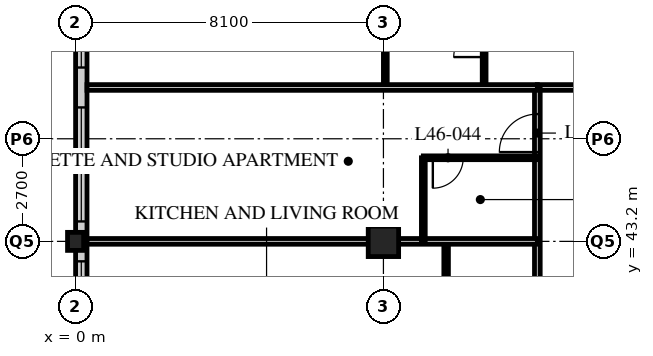
"""IFC4 building model, lengths in metres.
Left out: names, types, materials, properties, quantities, classifications, styles, units other than length and angle.
Written with IfcOpenShell. Run it as: python <this file> out.ifc"""

import sys

from ifc_helpers import new_model, si_unit, direction, frame, frame_2d, origin, origin_2d, place, context, subcontext, project, spatial, rectangle, hollow_rectangle, i_section, extrude, element, fill, save


model = new_model("IFC4")
c1 = context("Model", 3, precision=1e-05, world=origin(), true_north=direction((0.0, 1.0)))
c2 = subcontext(c1, "Body", "Model", "MODEL_VIEW")
j1 = project(units=[si_unit("LENGTHUNIT", "METRE"), si_unit("PLANEANGLEUNIT", "RADIAN")], contexts=[c1])
p1 = place(None, origin())
s1 = spatial("IfcSite", under=j1, at=p1, CompositionType="ELEMENT")
p2 = place(p1, origin())
s2 = spatial("IfcBuilding", under=s1, at=p2, CompositionType="ELEMENT")
p3 = place(p2, frame((0.0, 0.0, 181.2)))
s3 = spatial("IfcBuildingStorey", under=s2, at=p3, CompositionType="ELEMENT", Elevation=181.2)
p4 = place(p3, frame((0.0, 43.2, 0.0), z_axis=(0.0, 0.0, 1.0), x_axis=(1.0, 0.0, 0.0)))
e1 = element("IfcColumn", 1, at=p4, inside=s3, PredefinedType="COLUMN", context=c2, shape_type="SweptSolid", body=[
    extrude(i_section(OverallWidth=0.424, OverallDepth=0.475, WebThickness=0.048, FlangeThickness=0.077, FilletRadius=0.015, at=origin_2d()), origin(), (0.0, 0.0, 1.0), 3.6),
])
p5 = place(p3, frame((8.1, 43.2, 0.0), z_axis=(0.0, 0.0, 1.0), x_axis=(1.0, 0.0, 0.0)))
e2 = element("IfcColumn", 2, at=p5, inside=s3, PredefinedType="COLUMN", context=c2, shape_type="SweptSolid", body=[
    extrude(hollow_rectangle(XDim=0.8, YDim=0.8, WallThickness=0.08, at=origin_2d()), origin(), (0.0, 0.0, 1.0), 3.6),
])
p6 = place(p3, frame((0.15, 51.0, 0.0), z_axis=(0.0, 0.0, 1.0), x_axis=(0.0, -1.0, 0.0)))
e3 = element("IfcWall", 3, at=p6, inside=s3, PredefinedType="SOLIDWALL", context=c2, shape_type="SweptSolid", body=[
    extrude(rectangle(XDim=32.1, YDim=0.3, at=frame_2d((16.05, 0.0))), origin(), (0.0, 0.0, 1.0), 3.39),
])
p7 = place(p6, frame((0.225, 0.0, 0.6)))
e4 = element("IfcOpeningElement", 4, at=p7, cuts=e3, PredefinedType="OPENING", context=c2, shape_type="SweptSolid", body=[
    extrude(rectangle(XDim=3.0, YDim=2.4, at=frame_2d((1.5, 1.2))), frame((0.0, 0.16, 0.0), z_axis=(0.0, -1.0, 0.0), x_axis=(1.0, 0.0, 0.0)), (0.0, 0.0, 1.0), 0.32),
])
p8 = place(p6, frame((4.275, 0.0, 0.6)))
e5 = element("IfcOpeningElement", 5, at=p8, cuts=e3, PredefinedType="OPENING", context=c2, shape_type="SweptSolid", body=[
    extrude(rectangle(XDim=3.0, YDim=2.4, at=frame_2d((1.5, 1.2))), frame((0.0, 0.16, 0.0), z_axis=(0.0, -1.0, 0.0), x_axis=(1.0, 0.0, 0.0)), (0.0, 0.0, 1.0), 0.32),
])
p9 = place(p6, frame((8.325, 0.0, 0.6)))
e6 = element("IfcOpeningElement", 6, at=p9, cuts=e3, PredefinedType="OPENING", context=c2, shape_type="SweptSolid", body=[
    extrude(rectangle(XDim=3.0, YDim=2.4, at=frame_2d((1.5, 1.2))), frame((0.0, 0.16, 0.0), z_axis=(0.0, -1.0, 0.0), x_axis=(1.0, 0.0, 0.0)), (0.0, 0.0, 1.0), 0.32),
])
p10 = place(p6, frame((12.375, 0.0, 0.6)))
e7 = element("IfcOpeningElement", 7, at=p10, cuts=e3, PredefinedType="OPENING", context=c2, shape_type="SweptSolid", body=[
    extrude(rectangle(XDim=3.0, YDim=2.4, at=frame_2d((1.5, 1.2))), frame((0.0, 0.16, 0.0), z_axis=(0.0, -1.0, 0.0), x_axis=(1.0, 0.0, 0.0)), (0.0, 0.0, 1.0), 0.32),
])
p11 = place(p6, frame((16.425, 0.0, 0.6)))
e8 = element("IfcOpeningElement", 8, at=p11, cuts=e3, PredefinedType="OPENING", context=c2, shape_type="SweptSolid", body=[
    extrude(rectangle(XDim=3.0, YDim=2.4, at=frame_2d((1.5, 1.2))), frame((0.0, 0.16, 0.0), z_axis=(0.0, -1.0, 0.0), x_axis=(1.0, 0.0, 0.0)), (0.0, 0.0, 1.0), 0.32),
])
p12 = place(p6, frame((20.475, 0.0, 0.6)))
e9 = element("IfcOpeningElement", 9, at=p12, cuts=e3, PredefinedType="OPENING", context=c2, shape_type="SweptSolid", body=[
    extrude(rectangle(XDim=3.0, YDim=2.4, at=frame_2d((1.5, 1.2))), frame((0.0, 0.16, 0.0), z_axis=(0.0, -1.0, 0.0), x_axis=(1.0, 0.0, 0.0)), (0.0, 0.0, 1.0), 0.32),
])
p13 = place(p6, frame((24.525, 0.0, 0.6)))
e10 = element("IfcOpeningElement", 10, at=p13, cuts=e3, PredefinedType="OPENING", context=c2, shape_type="SweptSolid", body=[
    extrude(rectangle(XDim=3.0, YDim=2.4, at=frame_2d((1.5, 1.2))), frame((0.0, 0.16, 0.0), z_axis=(0.0, -1.0, 0.0), x_axis=(1.0, 0.0, 0.0)), (0.0, 0.0, 1.0), 0.32),
])
p14 = place(p6, frame((28.575, 0.0, 0.6)))
e11 = element("IfcOpeningElement", 11, at=p14, cuts=e3, PredefinedType="OPENING", context=c2, shape_type="SweptSolid", body=[
    extrude(rectangle(XDim=3.0, YDim=2.4, at=frame_2d((1.5, 1.2))), frame((0.0, 0.16, 0.0), z_axis=(0.0, -1.0, 0.0), x_axis=(1.0, 0.0, 0.0)), (0.0, 0.0, 1.0), 0.32),
])
p15 = place(p3, frame((12.15, 47.25, 0.0), z_axis=(0.0, 0.0, 1.0), x_axis=(1.0, 0.0, 0.0)))
e12 = element("IfcWall", 12, at=p15, inside=s3, PredefinedType="PARTITIONING", context=c2, shape_type="SweptSolid", body=[
    extrude(rectangle(XDim=32.4, YDim=0.15, at=frame_2d((16.2, 0.0))), origin(), (0.0, 0.0, 1.0), 3.39),
])
p16 = place(p15, frame((4.45, 0.0, 0.0)))
e13 = element("IfcOpeningElement", 13, at=p16, cuts=e12, PredefinedType="OPENING", context=c2, shape_type="SweptSolid", body=[
    extrude(rectangle(XDim=1.0, YDim=2.1, at=frame_2d((0.5, 1.05))), frame((0.0, 0.085, 0.0), z_axis=(0.0, -1.0, 0.0), x_axis=(1.0, 0.0, 0.0)), (0.0, 0.0, 1.0), 0.17),
])
p17 = place(p15, frame((16.6, 0.0, 0.0)))
e14 = element("IfcOpeningElement", 14, at=p17, cuts=e12, PredefinedType="OPENING", context=c2, shape_type="SweptSolid", body=[
    extrude(rectangle(XDim=1.0, YDim=2.1, at=frame_2d((0.5, 1.05))), frame((0.0, 0.085, 0.0), z_axis=(0.0, -1.0, 0.0), x_axis=(1.0, 0.0, 0.0)), (0.0, 0.0, 1.0), 0.17),
])
p18 = place(p15, frame((29.875, 0.0, 0.0)))
e15 = element("IfcOpeningElement", 15, at=p18, cuts=e12, PredefinedType="OPENING", context=c2, shape_type="SweptSolid", body=[
    extrude(rectangle(XDim=1.0, YDim=2.1, at=frame_2d((0.5, 1.05))), frame((0.0, 0.085, 0.0), z_axis=(0.0, -1.0, 0.0), x_axis=(1.0, 0.0, 0.0)), (0.0, 0.0, 1.0), 0.17),
])
p19 = place(p15, frame((1.525, 0.0, 0.0)))
e16 = element("IfcOpeningElement", 16, at=p19, cuts=e12, PredefinedType="OPENING", context=c2, shape_type="SweptSolid", body=[
    extrude(rectangle(XDim=1.0, YDim=2.1, at=frame_2d((0.5, 1.05))), frame((0.0, 0.085, 0.0), z_axis=(0.0, -1.0, 0.0), x_axis=(1.0, 0.0, 0.0)), (0.0, 0.0, 1.0), 0.17),
])
p20 = place(p3, frame((12.15, 18.9, 0.0), z_axis=(0.0, 0.0, 1.0), x_axis=(0.0, 1.0, 0.0)))
e17 = element("IfcWall", 17, at=p20, inside=s3, PredefinedType="PARTITIONING", context=c2, shape_type="SweptSolid", body=[
    extrude(rectangle(XDim=28.35, YDim=0.15, at=frame_2d((14.175, 0.0))), origin(), (0.0, 0.0, 1.0), 3.39),
])
p21 = place(p20, frame((2.35, 0.0, 0.0)))
e18 = element("IfcOpeningElement", 18, at=p21, cuts=e17, PredefinedType="OPENING", context=c2, shape_type="SweptSolid", body=[
    extrude(rectangle(XDim=1.0, YDim=2.1, at=frame_2d((0.5, 1.05))), frame((0.0, 0.085, 0.0), z_axis=(0.0, -1.0, 0.0), x_axis=(1.0, 0.0, 0.0)), (0.0, 0.0, 1.0), 0.17),
])
p22 = place(p20, frame((6.4, 0.0, 0.0)))
e19 = element("IfcOpeningElement", 19, at=p22, cuts=e17, PredefinedType="OPENING", context=c2, shape_type="SweptSolid", body=[
    extrude(rectangle(XDim=1.0, YDim=2.1, at=frame_2d((0.5, 1.05))), frame((0.0, 0.085, 0.0), z_axis=(0.0, -1.0, 0.0), x_axis=(1.0, 0.0, 0.0)), (0.0, 0.0, 1.0), 0.17),
])
p23 = place(p20, frame((8.5, 0.0, 0.0)))
e20 = element("IfcOpeningElement", 20, at=p23, cuts=e17, PredefinedType="OPENING", context=c2, shape_type="SweptSolid", body=[
    extrude(rectangle(XDim=1.0, YDim=2.1, at=frame_2d((0.5, 1.05))), frame((0.0, 0.085, 0.0), z_axis=(0.0, -1.0, 0.0), x_axis=(1.0, 0.0, 0.0)), (0.0, 0.0, 1.0), 0.17),
])
p24 = place(p20, frame((16.6, 0.0, 0.0)))
e21 = element("IfcOpeningElement", 21, at=p24, cuts=e17, PredefinedType="OPENING", context=c2, shape_type="SweptSolid", body=[
    extrude(rectangle(XDim=1.0, YDim=2.1, at=frame_2d((0.5, 1.05))), frame((0.0, 0.085, 0.0), z_axis=(0.0, -1.0, 0.0), x_axis=(1.0, 0.0, 0.0)), (0.0, 0.0, 1.0), 0.17),
])
p25 = place(p20, frame((26.65, 0.0, 0.0)))
e22 = element("IfcOpeningElement", 22, at=p25, cuts=e17, PredefinedType="OPENING", context=c2, shape_type="SweptSolid", body=[
    extrude(rectangle(XDim=1.0, YDim=2.1, at=frame_2d((0.5, 1.05))), frame((0.0, 0.085, 0.0), z_axis=(0.0, -1.0, 0.0), x_axis=(1.0, 0.0, 0.0)), (0.0, 0.0, 1.0), 0.17),
])
p26 = place(p3, frame((9.75, 27.0, 0.0), z_axis=(0.0, 0.0, 1.0), x_axis=(0.0, 1.0, 0.0)))
e23 = element("IfcWall", 23, at=p26, inside=s3, PredefinedType="PARTITIONING", context=c2, shape_type="SweptSolid", body=[
    extrude(rectangle(XDim=16.2, YDim=0.12, at=frame_2d((8.1, 0.0))), origin(), (0.0, 0.0, 1.0), 3.39),
])
p27 = place(p26, frame((0.975, 0.0, 0.0)))
e24 = element("IfcOpeningElement", 24, at=p27, cuts=e23, PredefinedType="OPENING", context=c2, shape_type="SweptSolid", body=[
    extrude(rectangle(XDim=0.85, YDim=2.1, at=frame_2d((0.425, 1.05))), frame((0.0, 0.07, 0.0), z_axis=(0.0, -1.0, 0.0), x_axis=(1.0, 0.0, 0.0)), (0.0, 0.0, 1.0), 0.14),
])
p28 = place(p26, frame((4.375, 0.0, 0.0)))
e25 = element("IfcOpeningElement", 25, at=p28, cuts=e23, PredefinedType="OPENING", context=c2, shape_type="SweptSolid", body=[
    extrude(rectangle(XDim=0.85, YDim=2.1, at=frame_2d((0.425, 1.05))), frame((0.0, 0.07, 0.0), z_axis=(0.0, -1.0, 0.0), x_axis=(1.0, 0.0, 0.0)), (0.0, 0.0, 1.0), 0.14),
])
p29 = place(p26, frame((9.075, 0.0, 0.0)))
e26 = element("IfcOpeningElement", 26, at=p29, cuts=e23, PredefinedType="OPENING", context=c2, shape_type="SweptSolid", body=[
    extrude(rectangle(XDim=0.85, YDim=2.1, at=frame_2d((0.425, 1.05))), frame((0.0, 0.07, 0.0), z_axis=(0.0, -1.0, 0.0), x_axis=(1.0, 0.0, 0.0)), (0.0, 0.0, 1.0), 0.14),
])
p30 = place(p26, frame((12.475, 0.0, 0.0)))
e27 = element("IfcOpeningElement", 27, at=p30, cuts=e23, PredefinedType="OPENING", context=c2, shape_type="SweptSolid", body=[
    extrude(rectangle(XDim=0.85, YDim=2.1, at=frame_2d((0.425, 1.05))), frame((0.0, 0.07, 0.0), z_axis=(0.0, -1.0, 0.0), x_axis=(1.0, 0.0, 0.0)), (0.0, 0.0, 1.0), 0.14),
])
p31 = place(p3, frame((12.15, 43.2, 0.0), z_axis=(0.0, 0.0, 1.0), x_axis=(-1.0, 0.0, 0.0)))
e28 = element("IfcWall", 28, at=p31, inside=s3, PredefinedType="PARTITIONING", context=c2, shape_type="SweptSolid", body=[
    extrude(rectangle(XDim=11.85, YDim=0.15, at=frame_2d((5.925, 0.0))), origin(), (0.0, 0.0, 1.0), 2.778),
])
p32 = place(p3, frame((9.15, 43.2, 0.0), z_axis=(0.0, 0.0, 1.0), x_axis=(0.0, 1.0, 0.0)))
e29 = element("IfcWall", 29, at=p32, inside=s3, PredefinedType="PARTITIONING", context=c2, shape_type="SweptSolid", body=[
    extrude(rectangle(XDim=2.2, YDim=0.1, at=frame_2d((1.1, 0.0))), origin(), (0.0, 0.0, 1.0), 3.39),
])
p33 = place(p3, frame((12.15, 45.4, 0.0), z_axis=(0.0, 0.0, 1.0), x_axis=(-1.0, 0.0, 0.0)))
e30 = element("IfcWall", 30, at=p33, inside=s3, PredefinedType="PARTITIONING", context=c2, shape_type="SweptSolid", body=[
    extrude(rectangle(XDim=3.0, YDim=0.1, at=frame_2d((1.5, 0.0))), origin(), (0.0, 0.0, 1.0), 3.39),
])
p34 = place(p33, frame((1.95, 0.0, 0.0)))
e31 = element("IfcOpeningElement", 31, at=p34, cuts=e30, PredefinedType="OPENING", context=c2, shape_type="SweptSolid", body=[
    extrude(rectangle(XDim=0.8, YDim=2.1, at=frame_2d((0.4, 1.05))), frame((0.0, 0.06, 0.0), z_axis=(0.0, -1.0, 0.0), x_axis=(1.0, 0.0, 0.0)), (0.0, 0.0, 1.0), 0.12),
])
p35 = place(p3, frame((10.75, 47.25, 0.0), z_axis=(0.0, 0.0, 1.0), x_axis=(0.0, 1.0, 0.0)))
e32 = element("IfcWall", 32, at=p35, inside=s3, PredefinedType="PARTITIONING", context=c2, shape_type="SweptSolid", body=[
    extrude(rectangle(XDim=2.4, YDim=0.1, at=frame_2d((1.2, 0.0))), origin(), (0.0, 0.0, 1.0), 3.39),
])
p36 = place(p35, frame((0.8, 0.0, 0.0)))
e33 = element("IfcOpeningElement", 33, at=p36, cuts=e32, PredefinedType="OPENING", context=c2, shape_type="SweptSolid", body=[
    extrude(rectangle(XDim=0.8, YDim=2.1, at=frame_2d((0.4, 1.05))), frame((0.0, 0.06, 0.0), z_axis=(0.0, -1.0, 0.0), x_axis=(1.0, 0.0, 0.0)), (0.0, 0.0, 1.0), 0.12),
])
p37 = place(p3, frame((8.15, 47.25, 0.0), z_axis=(0.0, 0.0, 1.0), x_axis=(0.0, 1.0, 0.0)))
e34 = element("IfcWall", 34, at=p37, inside=s3, PredefinedType="PARTITIONING", context=c2, shape_type="SweptSolid", body=[
    extrude(rectangle(XDim=2.4, YDim=0.1, at=frame_2d((1.2, 0.0))), origin(), (0.0, 0.0, 1.0), 2.778),
])
p38 = place(p3, frame((0.3, 47.25, 0.0), z_axis=(0.0, 0.0, 1.0), x_axis=(1.0, 0.0, 0.0)))
e35 = element("IfcWall", 35, at=p38, inside=s3, PredefinedType="PARTITIONING", context=c2, shape_type="SweptSolid", body=[
    extrude(rectangle(XDim=11.85, YDim=0.15, at=frame_2d((5.925, 0.0))), origin(), (0.0, 0.0, 1.0), 3.39),
])
p39 = place(p7, origin())
e36 = element("IfcWindow", 36, at=p39, inside=s3, PartitioningType="SINGLE_PANEL", PredefinedType="WINDOW", context=c2, shape_type="SweptSolid", body=[
    extrude(rectangle(XDim=3.0, YDim=2.4, at=frame_2d((1.5, 1.2))), frame((0.0, 0.03, 0.0), z_axis=(0.0, -1.0, 0.0), x_axis=(1.0, 0.0, 0.0)), (0.0, 0.0, 1.0), 0.06),
])
fill(e4, e36)
p40 = place(p8, origin())
e37 = element("IfcWindow", 37, at=p40, inside=s3, PartitioningType="SINGLE_PANEL", PredefinedType="WINDOW", context=c2, shape_type="SweptSolid", body=[
    extrude(rectangle(XDim=3.0, YDim=2.4, at=frame_2d((1.5, 1.2))), frame((0.0, 0.03, 0.0), z_axis=(0.0, -1.0, 0.0), x_axis=(1.0, 0.0, 0.0)), (0.0, 0.0, 1.0), 0.06),
])
fill(e5, e37)
p41 = place(p9, origin())
e38 = element("IfcWindow", 38, at=p41, inside=s3, PartitioningType="SINGLE_PANEL", PredefinedType="WINDOW", context=c2, shape_type="SweptSolid", body=[
    extrude(rectangle(XDim=3.0, YDim=2.4, at=frame_2d((1.5, 1.2))), frame((0.0, 0.03, 0.0), z_axis=(0.0, -1.0, 0.0), x_axis=(1.0, 0.0, 0.0)), (0.0, 0.0, 1.0), 0.06),
])
fill(e6, e38)
p42 = place(p34, origin())
e39 = element("IfcDoor", 39, at=p42, inside=s3, OperationType="SINGLE_SWING_RIGHT", PredefinedType="DOOR", context=c2, shape_type="SweptSolid", body=[
    extrude(rectangle(XDim=0.8, YDim=2.1, at=frame_2d((0.4, 1.05))), frame((0.0, 0.025, 0.0), z_axis=(0.0, -1.0, 0.0), x_axis=(1.0, 0.0, 0.0)), (0.0, 0.0, 1.0), 0.05),
])
fill(e31, e39)
p43 = place(p25, origin())
e40 = element("IfcDoor", 40, at=p43, inside=s3, OperationType="SINGLE_SWING_LEFT", PredefinedType="DOOR", context=c2, shape_type="SweptSolid", body=[
    extrude(rectangle(XDim=1.0, YDim=2.1, at=frame_2d((0.5, 1.05))), frame((0.0, 0.025, 0.0), z_axis=(0.0, -1.0, 0.0), x_axis=(1.0, 0.0, 0.0)), (0.0, 0.0, 1.0), 0.05),
])
fill(e22, e40)
p44 = place(p36, origin())
e41 = element("IfcDoor", 41, at=p44, inside=s3, OperationType="SINGLE_SWING_LEFT", PredefinedType="DOOR", context=c2, shape_type="SweptSolid", body=[
    extrude(rectangle(XDim=0.8, YDim=2.1, at=frame_2d((0.4, 1.05))), frame((0.0, 0.025, 0.0), z_axis=(0.0, -1.0, 0.0), x_axis=(1.0, 0.0, 0.0)), (0.0, 0.0, 1.0), 0.05),
])
fill(e33, e41)
save(model, sys.argv[1])
